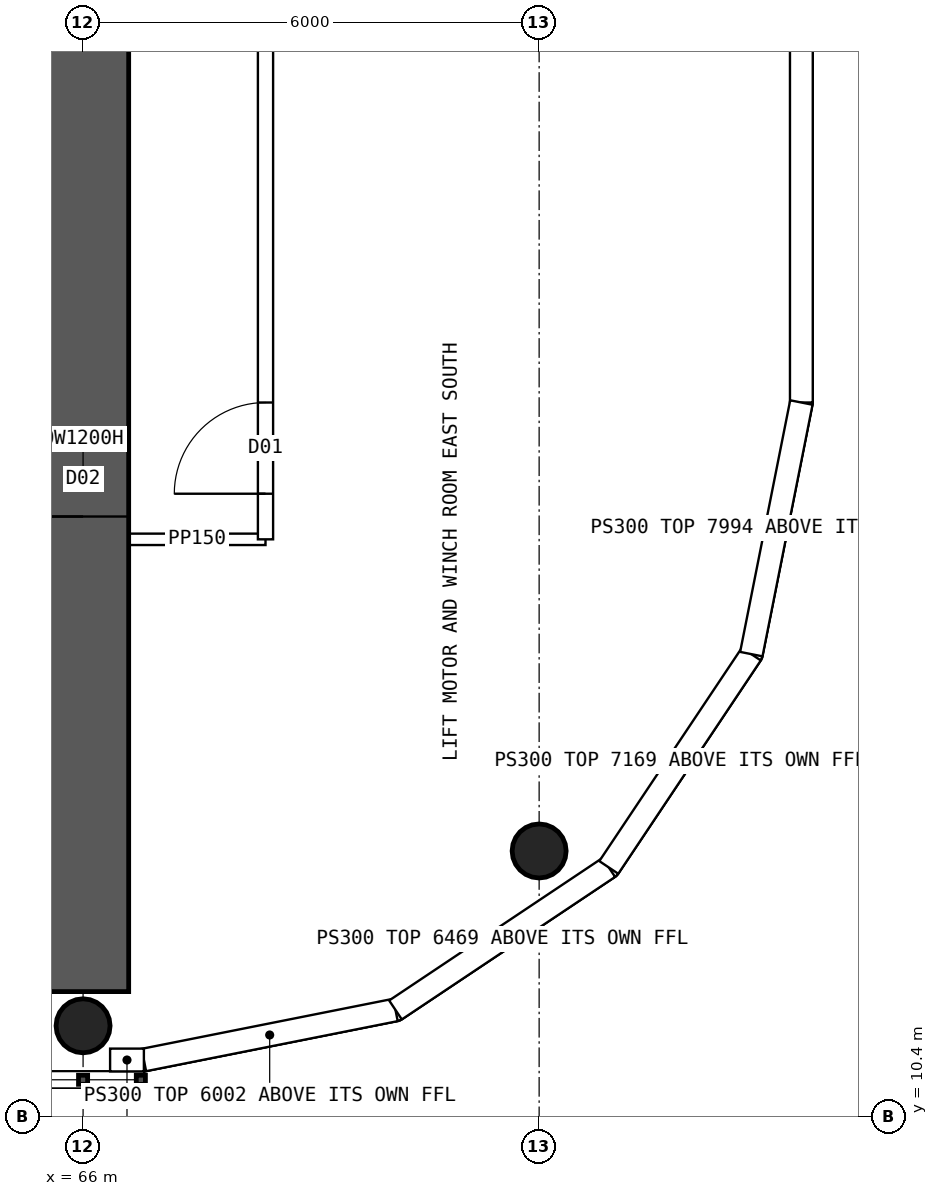
"""IFC4 building model, lengths in metres.
Left out: names, types, materials, properties, quantities, classifications, styles, units other than length and angle.
Written with IfcOpenShell. Run it as: python <this file> out.ifc"""

import sys

from ifc_helpers import new_model, si_unit, direction, frame, frame_2d, origin, origin_2d, place, context, subcontext, project, spatial, polyline, rectangle, hollow_circle, outline, extrude, clip, halfspace, element, fill, save


model = new_model("IFC4")
c1 = context("Model", 3, precision=1e-05, world=origin(), true_north=direction((0.0, 1.0)))
c2 = subcontext(c1, "Body", "Model", "MODEL_VIEW")
j1 = project(units=[si_unit("LENGTHUNIT", "METRE"), si_unit("PLANEANGLEUNIT", "RADIAN")], contexts=[c1])
p1 = place(None, origin())
s1 = spatial("IfcSite", under=j1, at=p1, CompositionType="ELEMENT")
p2 = place(p1, origin())
s2 = spatial("IfcBuilding", under=s1, at=p2, CompositionType="ELEMENT")
p3 = place(p2, frame((0.0, 0.0, 262.3)))
s3 = spatial("IfcBuildingStorey", under=s2, at=p3, CompositionType="ELEMENT", Elevation=262.3)
p4 = place(p3, frame((66.0, 12.05, 0.0), z_axis=(0.0, 0.0, 1.0), x_axis=(0.0, 1.0, 0.0)))
e1 = element("IfcWall", 1, at=p4, inside=s3, PredefinedType="SHEAR", context=c2, shape_type="SweptSolid", body=[
    extrude(rectangle(XDim=13.45, YDim=1.2, at=frame_2d((6.725, 0.0))), origin(), (0.0, 0.0, 1.0), 4.4),
])
p5 = place(p4, frame((6.25, 0.0, 0.0)))
e2 = element("IfcOpeningElement", 2, at=p5, cuts=e1, PredefinedType="OPENING", context=c2, shape_type="SweptSolid", body=[
    extrude(rectangle(XDim=1.0, YDim=2.1, at=frame_2d((0.5, 1.05))), frame((0.0, 0.61, 0.0), z_axis=(0.0, -1.0, 0.0), x_axis=(1.0, 0.0, 0.0)), (0.0, 0.0, 1.0), 1.22),
])
p6 = place(p3, frame((66.0, 11.6, 0.0), z_axis=(0.0, 0.0, 1.0), x_axis=(1.0, 0.0, 0.0)))
e3 = element("IfcColumn", 3, at=p6, inside=s3, PredefinedType="COLUMN", context=c2, shape_type="SweptSolid", body=[
    extrude(hollow_circle(Radius=0.355, WallThickness=0.025, at=origin_2d()), origin(), (0.0, 0.0, 1.0), 4.885),
])
p7 = place(p3, frame((72.0, 13.9, 0.0), z_axis=(0.0, 0.0, 1.0), x_axis=(1.0, 0.0, 0.0)))
e4 = element("IfcColumn", 4, at=p7, inside=s3, PredefinedType="COLUMN", context=c2, shape_type="SweptSolid", body=[
    extrude(hollow_circle(Radius=0.355, WallThickness=0.025, at=origin_2d()), origin(), (0.0, 0.0, 1.0), 5.466),
])
p8 = place(p3, frame((75.45, 19.8, 0.0), z_axis=(0.0, 0.0, 1.0), x_axis=(0.0, 1.0, 0.0)))
e5 = element("IfcWall", 5, at=p8, inside=s3, PredefinedType="SOLIDWALL", context=c2, shape_type="Clipping", body=[
    clip(clip(extrude(outline(polyline([(-0.025, 0.0), (24.425, 0.0), (24.425, 14.084), (-0.025, 7.988), (-0.025, 0.0)])), frame((0.0, 0.15, 0.0), z_axis=(0.0, -1.0, 0.0), x_axis=(1.0, 0.0, 0.0)), (0.0, 0.0, 1.0), 0.3), halfspace(frame((0.0, 0.0, 0.0), z_axis=(-0.995184726707, 0.098017139978, 0.0)), False)), halfspace(frame((24.4, 0.0, 0.0), z_axis=(0.995184726707, 0.098017139978, 0.0)), False)),
])
p9 = place(p3, frame((66.8, 11.15, 0.0), z_axis=(0.0, 0.0, 1.0), x_axis=(0.98078325777, 0.195100490205, 0.0)))
e6 = element("IfcWall", 6, at=p9, inside=s3, PredefinedType="SOLIDWALL", context=c2, shape_type="Clipping", body=[
    clip(clip(extrude(outline(polyline([(-0.04, 0.0), (3.415, 0.0), (3.415, 6.003), (-0.04, 5.835), (-0.04, 0.0)])), frame((0.0, 0.15, 0.0), z_axis=(0.0, -1.0, 0.0), x_axis=(1.0, 0.0, 0.0)), (0.0, 0.0, 1.0), 0.3), halfspace(frame((0.0, 0.0, 0.0), z_axis=(-0.980785349348, 0.195089975409, 0.0)), False)), halfspace(frame((3.375, 0.0, 0.0), z_axis=(0.980785349348, 0.195089975409, 0.0)), False)),
])
p10 = place(p3, frame((70.11, 11.808, 0.0), z_axis=(0.0, 0.0, 1.0), x_axis=(0.831460037396, 0.555584562613, 0.0)))
e7 = element("IfcWall", 7, at=p10, inside=s3, PredefinedType="SOLIDWALL", context=c2, shape_type="Clipping", body=[
    clip(clip(extrude(outline(polyline([(-0.04, 0.0), (3.415, 0.0), (3.415, 6.475), (3.375, 6.469), (-0.04, 5.996), (-0.04, 0.0)])), frame((0.0, 0.15, 0.0), z_axis=(0.0, -1.0, 0.0), x_axis=(1.0, 0.0, 0.0)), (0.0, 0.0, 1.0), 0.3), halfspace(frame((0.0, 0.0, 0.0), z_axis=(-0.980785349348, 0.195089975409, 0.0)), False)), halfspace(frame((3.375, 0.0, 0.0), z_axis=(0.980785349348, 0.195089975409, 0.0)), False)),
])
p11 = place(p3, frame((72.917, 13.684, 0.0), z_axis=(0.0, 0.0, 1.0), x_axis=(0.555567969291, 0.831471124873, 0.0)))
e8 = element("IfcWall", 8, at=p11, inside=s3, PredefinedType="SOLIDWALL", context=c2, shape_type="Clipping", body=[
    clip(clip(extrude(outline(polyline([(-0.04, 0.0), (3.415, 0.0), (3.415, 7.177), (-0.04, 6.461), (-0.04, 0.0)])), frame((0.0, 0.15, 0.0), z_axis=(0.0, -1.0, 0.0), x_axis=(1.0, 0.0, 0.0)), (0.0, 0.0, 1.0), 0.3), halfspace(frame((0.0, 0.0, 0.0), z_axis=(-0.980785349348, 0.195089975409, 0.0)), False)), halfspace(frame((3.375, 0.0, 0.0), z_axis=(0.980785349348, 0.195089975409, 0.0)), False)),
])
p12 = place(p3, frame((74.792, 16.49, 0.0), z_axis=(0.0, 0.0, 1.0), x_axis=(0.19508664885, 0.980786011034, 0.0)))
e9 = element("IfcWall", 9, at=p12, inside=s3, PredefinedType="SOLIDWALL", context=c2, shape_type="Clipping", body=[
    clip(clip(extrude(outline(polyline([(-0.04, 0.0), (3.415, 0.0), (3.415, 8.004), (3.375, 7.994), (-0.04, 7.159), (-0.04, 0.0)])), frame((0.0, 0.15, 0.0), z_axis=(0.0, -1.0, 0.0), x_axis=(1.0, 0.0, 0.0)), (0.0, 0.0, 1.0), 0.3), halfspace(frame((0.0, 0.0, 0.0), z_axis=(-0.980785349348, 0.195089975409, 0.0)), False)), halfspace(frame((3.375, 0.0, 0.0), z_axis=(0.995184765828, 0.098016742771, 0.0)), False)),
])
p13 = place(p3, frame((66.8, 11.15, 0.0), z_axis=(0.0, 0.0, 1.0), x_axis=(-1.0, 0.0, 0.0)))
e10 = element("IfcWall", 10, at=p13, inside=s3, PredefinedType="SOLIDWALL", context=c2, shape_type="SweptSolid", body=[
    extrude(outline(polyline([(0.0, 0.0), (0.445, 0.0), (0.445, 5.837), (0.0, 5.837), (0.0, 0.0)])), frame((0.0, 0.15, 0.0), z_axis=(0.0, -1.0, 0.0), x_axis=(1.0, 0.0, 0.0)), (0.0, 0.0, 1.0), 0.3),
])
p14 = place(p3, frame((68.4, 18.0, 0.0), z_axis=(0.0, 0.0, 1.0), x_axis=(0.0, 1.0, 0.0)))
e11 = element("IfcWall", 11, at=p14, inside=s3, PredefinedType="SOLIDWALL", context=c2, shape_type="SweptSolid", body=[
    extrude(rectangle(XDim=28.0, YDim=0.2, at=frame_2d((14.0, 0.0))), origin(), (0.0, 0.0, 1.0), 6.0),
])
p15 = place(p14, frame((13.1, 0.0, 0.0)))
e12 = element("IfcOpeningElement", 12, at=p15, cuts=e11, PredefinedType="OPENING", context=c2, shape_type="SweptSolid", body=[
    extrude(rectangle(XDim=1.8, YDim=2.1, at=frame_2d((0.9, 1.05))), frame((0.0, 0.11, 0.0), z_axis=(0.0, -1.0, 0.0), x_axis=(1.0, 0.0, 0.0)), (0.0, 0.0, 1.0), 0.22),
])
p16 = place(p14, frame((26.2, 0.0, 0.0)))
e13 = element("IfcOpeningElement", 13, at=p16, cuts=e11, PredefinedType="OPENING", context=c2, shape_type="SweptSolid", body=[
    extrude(rectangle(XDim=1.2, YDim=2.1, at=frame_2d((0.6, 1.05))), frame((0.0, 0.11, 0.0), z_axis=(0.0, -1.0, 0.0), x_axis=(1.0, 0.0, 0.0)), (0.0, 0.0, 1.0), 0.22),
])
p17 = place(p14, frame((0.6, 0.0, 0.0)))
e14 = element("IfcOpeningElement", 14, at=p17, cuts=e11, PredefinedType="OPENING", context=c2, shape_type="SweptSolid", body=[
    extrude(rectangle(XDim=1.2, YDim=2.1, at=frame_2d((0.6, 1.05))), frame((0.0, 0.11, 0.0), z_axis=(0.0, -1.0, 0.0), x_axis=(1.0, 0.0, 0.0)), (0.0, 0.0, 1.0), 0.22),
])
p18 = place(p3, frame((66.6, 18.0, 0.0), z_axis=(0.0, 0.0, 1.0), x_axis=(1.0, 0.0, 0.0)))
e15 = element("IfcWall", 15, at=p18, inside=s3, PredefinedType="PARTITIONING", context=c2, shape_type="SweptSolid", body=[
    extrude(rectangle(XDim=1.8, YDim=0.15, at=frame_2d((0.9, 0.0))), origin(), (0.0, 0.0, 1.0), 6.0),
])
p19 = place(p17, origin())
e16 = element("IfcDoor", 16, at=p19, inside=s3, OperationType="SINGLE_SWING_LEFT", PredefinedType="DOOR", context=c2, shape_type="SweptSolid", body=[
    extrude(rectangle(XDim=1.2, YDim=2.1, at=frame_2d((0.6, 1.05))), frame((0.0, 0.025, 0.0), z_axis=(0.0, -1.0, 0.0), x_axis=(1.0, 0.0, 0.0)), (0.0, 0.0, 1.0), 0.05),
])
fill(e14, e16)
p20 = place(p5, origin())
e17 = element("IfcDoor", 17, at=p20, inside=s3, OperationType="SINGLE_SWING_LEFT", PredefinedType="DOOR", context=c2, shape_type="SweptSolid", body=[
    extrude(rectangle(XDim=1.0, YDim=2.1, at=frame_2d((0.5, 1.05))), frame((0.0, 0.025, 0.0), z_axis=(0.0, -1.0, 0.0), x_axis=(1.0, 0.0, 0.0)), (0.0, 0.0, 1.0), 0.05),
])
fill(e2, e17)
save(model, sys.argv[1])
